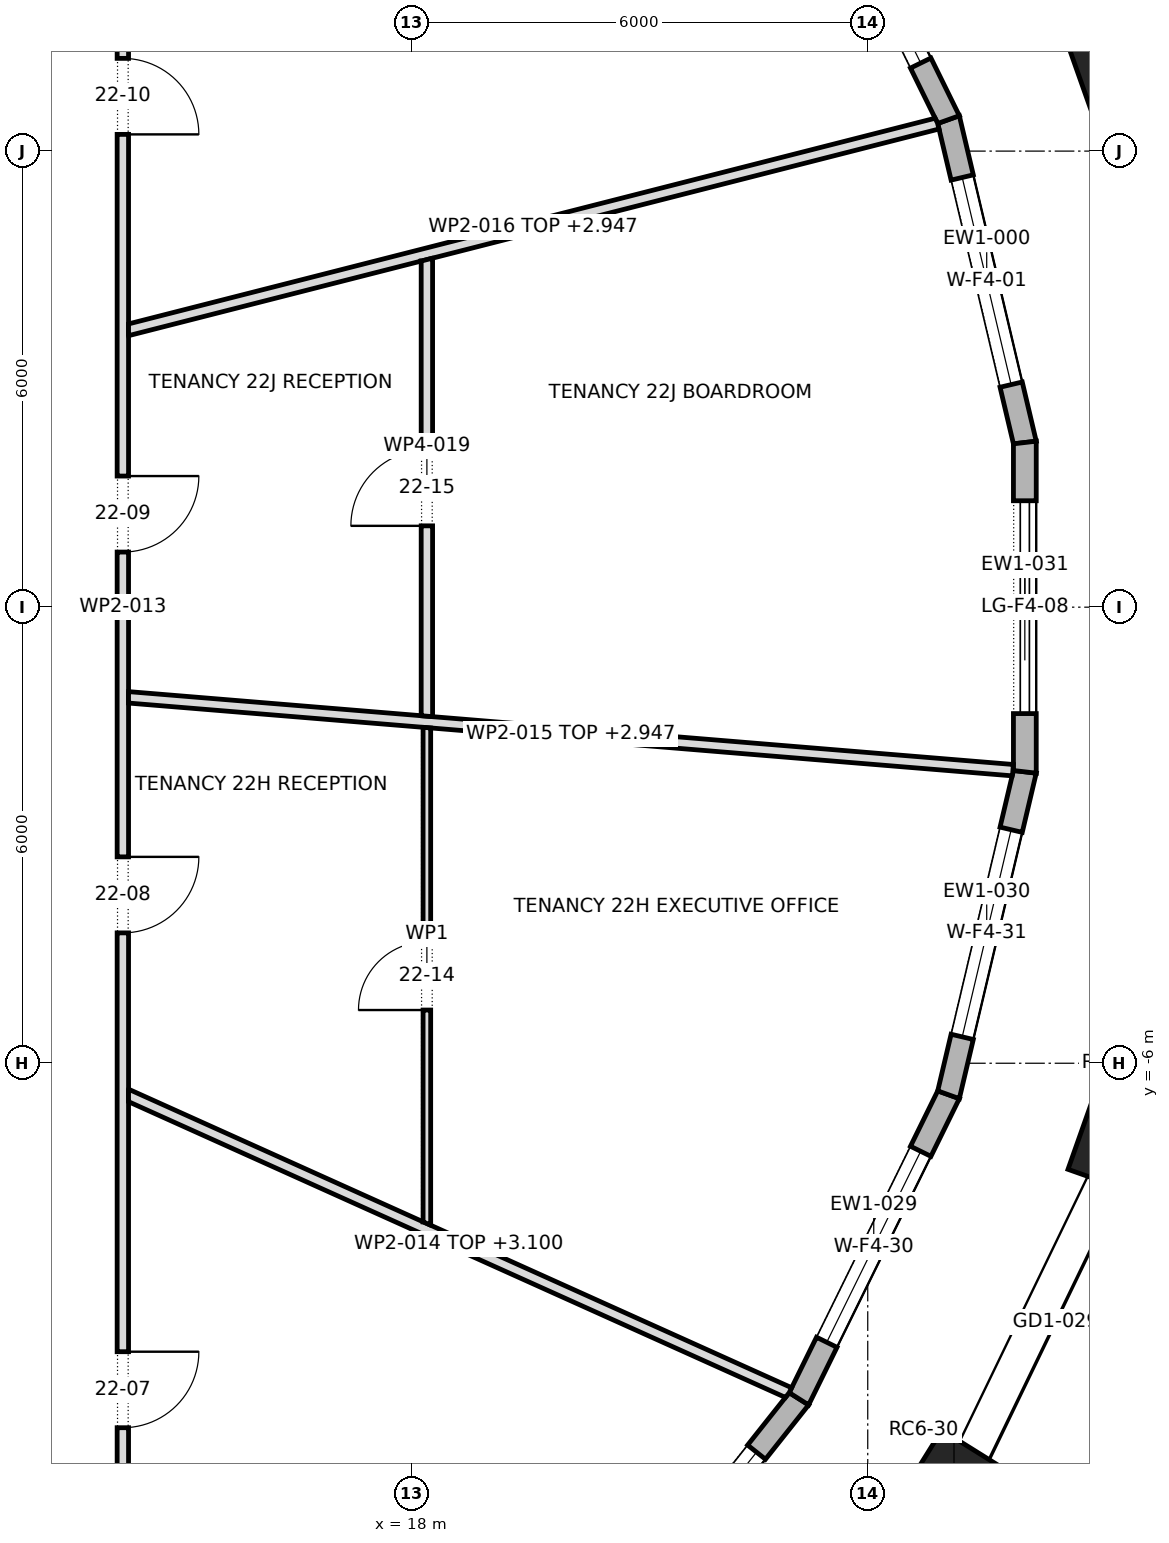
"""IFC4 building model, lengths in metres.
Left out: names, types, materials, properties, quantities, classifications, styles, units other than length and angle.
Written with IfcOpenShell. Run it as: python <this file> out.ifc"""

import sys

from ifc_helpers import new_model, si_unit, direction, frame, frame_2d, origin, origin_2d, place, context, subcontext, project, spatial, polyline, rectangle, outline, extrude, element, fill, save


model = new_model("IFC4")
c1 = context("Model", 3, precision=1e-05, world=origin(), true_north=direction((0.0, 1.0)))
c2 = subcontext(c1, "Body", "Model", "MODEL_VIEW")
j1 = project(units=[si_unit("LENGTHUNIT", "METRE"), si_unit("PLANEANGLEUNIT", "RADIAN")], contexts=[c1])
p1 = place(None, origin())
s1 = spatial("IfcSite", under=j1, at=p1, CompositionType="ELEMENT")
p2 = place(p1, origin())
s2 = spatial("IfcBuilding", under=s1, at=p2, CompositionType="ELEMENT")
p3 = place(p2, frame((0.0, 0.0, 312.3)))
s3 = spatial("IfcBuildingStorey", under=s2, at=p3, CompositionType="ELEMENT", Elevation=312.3)
for number, where, z_axis, x_axis in (
    (1, (27.273, 7.091, 0.0), (0.0, 0.0, 1.0), (-0.334, 0.943, 0.0)),
    (2, (25.135, -11.516, 0.0), (0.0, 0.0, 1.0), (0.529, 0.849, 0.0)),
    (3, (27.273, -7.091, 0.0), (0.0, 0.0, 1.0), (0.334, 0.943, 0.0)),
):
    element("IfcColumn", number, at=place(p3, frame(where, z_axis=z_axis, x_axis=x_axis)), inside=s3, PredefinedType="COLUMN", context=c2, shape_type="SweptSolid", body=[
        extrude(rectangle(XDim=1.0, YDim=1.0, at=origin_2d()), origin(), (0.0, 0.0, 1.0), 4.0),
    ])
p4 = place(p3, frame((26.067, 2.166, 0.0), z_axis=(0.0, 0.0, 1.0), x_axis=(-0.229974411334, 0.973196675977, 0.0)))
e4 = element("IfcWall", 4, at=p4, inside=s3, PredefinedType="STANDARD", context=c2, shape_type="SweptSolid", body=[
    extrude(outline(polyline([(-0.018, -0.15), (4.382, -0.15), (4.348, 0.15), (0.018, 0.15), (-0.018, -0.15)])), origin(), (0.0, 0.0, 1.0), 3.7),
])
p5 = place(p4, frame((0.783, 0.0, 0.6)))
e5 = element("IfcOpeningElement", 5, at=p5, cuts=e4, PredefinedType="OPENING", context=c2, shape_type="SweptSolid", body=[
    extrude(rectangle(XDim=2.8, YDim=2.65, at=frame_2d((1.4, 1.325))), frame((0.0, 0.162, 0.0), z_axis=(0.0, -1.0, 0.0), x_axis=(1.0, 0.0, 0.0)), (0.0, 0.0, 1.0), 0.324),
])
p6 = place(p3, frame((25.063, 6.415, 0.0), z_axis=(0.0, 0.0, 1.0), x_axis=(-0.441509050872, 0.897256796017, 0.0)))
e6 = element("IfcWall", 6, at=p6, inside=s3, PredefinedType="STANDARD", context=c2, shape_type="SweptSolid", body=[
    extrude(outline(polyline([(-0.017, -0.15), (4.474, -0.15), (4.442, 0.15), (0.017, 0.15), (-0.017, -0.15)])), origin(), (0.0, 0.0, 1.0), 3.7),
])
p7 = place(p6, frame((0.829, 0.0, 0.6)))
e7 = element("IfcOpeningElement", 7, at=p7, cuts=e6, PredefinedType="OPENING", context=c2, shape_type="SweptSolid", body=[
    extrude(rectangle(XDim=2.8, YDim=2.65, at=frame_2d((1.4, 1.325))), frame((0.0, 0.162, 0.0), z_axis=(0.0, -1.0, 0.0), x_axis=(1.0, 0.0, 0.0)), (0.0, 0.0, 1.0), 0.324),
])
p8 = place(p3, frame((20.239, -14.012, 0.0), z_axis=(0.0, 0.0, 1.0), x_axis=(0.621682706372, 0.78326918272, 0.0)))
e8 = element("IfcWall", 8, at=p8, inside=s3, PredefinedType="STANDARD", context=c2, shape_type="SweptSolid", body=[
    extrude(outline(polyline([(-0.015, -0.15), (4.609, -0.15), (4.577, 0.15), (0.015, 0.15), (-0.015, -0.15)])), origin(), (0.0, 0.0, 1.0), 3.7),
])
p9 = place(p8, frame((0.896, 0.0, 0.6)))
e9 = element("IfcOpeningElement", 9, at=p9, cuts=e8, PredefinedType="OPENING", context=c2, shape_type="SweptSolid", body=[
    extrude(rectangle(XDim=2.8, YDim=2.65, at=frame_2d((1.4, 1.325))), frame((0.0, 0.162, 0.0), z_axis=(0.0, -1.0, 0.0), x_axis=(1.0, 0.0, 0.0)), (0.0, 0.0, 1.0), 0.324),
])
p10 = place(p3, frame((23.094, -10.415, 0.0), z_axis=(0.0, 0.0, 1.0), x_axis=(0.441509050872, 0.897256796017, 0.0)))
e10 = element("IfcWall", 10, at=p10, inside=s3, PredefinedType="STANDARD", context=c2, shape_type="SweptSolid", body=[
    extrude(outline(polyline([(-0.016, -0.15), (4.475, -0.15), (4.441, 0.15), (0.016, 0.15), (-0.016, -0.15)])), origin(), (0.0, 0.0, 1.0), 3.7),
])
p11 = place(p10, frame((0.829, 0.0, 0.6)))
e11 = element("IfcOpeningElement", 11, at=p11, cuts=e10, PredefinedType="OPENING", context=c2, shape_type="SweptSolid", body=[
    extrude(rectangle(XDim=2.8, YDim=2.65, at=frame_2d((1.4, 1.325))), frame((0.0, 0.162, 0.0), z_axis=(0.0, -1.0, 0.0), x_axis=(1.0, 0.0, 0.0)), (0.0, 0.0, 1.0), 0.324),
])
p12 = place(p3, frame((25.063, -6.415, 0.0), z_axis=(0.0, 0.0, 1.0), x_axis=(0.229974411334, 0.973196675977, 0.0)))
e12 = element("IfcWall", 12, at=p12, inside=s3, PredefinedType="STANDARD", context=c2, shape_type="SweptSolid", body=[
    extrude(outline(polyline([(-0.017, -0.15), (4.383, -0.15), (4.348, 0.15), (0.017, 0.15), (-0.017, -0.15)])), origin(), (0.0, 0.0, 1.0), 3.7),
])
p13 = place(p12, frame((0.783, 0.0, 0.6)))
e13 = element("IfcOpeningElement", 13, at=p13, cuts=e12, PredefinedType="OPENING", context=c2, shape_type="SweptSolid", body=[
    extrude(rectangle(XDim=2.8, YDim=2.65, at=frame_2d((1.4, 1.325))), frame((0.0, 0.162, 0.0), z_axis=(0.0, -1.0, 0.0), x_axis=(1.0, 0.0, 0.0)), (0.0, 0.0, 1.0), 0.324),
])
p14 = place(p3, frame((26.067, -2.166, 0.0), z_axis=(0.0, 0.0, 1.0), x_axis=(0.0, 1.0, 0.0)))
e14 = element("IfcWall", 14, at=p14, inside=s3, PredefinedType="STANDARD", context=c2, shape_type="SweptSolid", body=[
    extrude(outline(polyline([(-0.018, -0.15), (4.35, -0.15), (4.315, 0.15), (0.018, 0.15), (-0.018, -0.15)])), origin(), (0.0, 0.0, 1.0), 3.7),
])
p15 = place(p14, frame((0.766, 0.0, 0.0)))
e15 = element("IfcOpeningElement", 15, at=p15, cuts=e14, PredefinedType="OPENING", context=c2, shape_type="SweptSolid", body=[
    extrude(rectangle(XDim=2.8, YDim=3.25, at=frame_2d((1.4, 1.625))), frame((0.0, 0.162, 0.0), z_axis=(0.0, -1.0, 0.0), x_axis=(1.0, 0.0, 0.0)), (0.0, 0.0, 1.0), 0.324),
])
p16 = place(p3, frame((14.2, -14.275, 0.0), z_axis=(0.0, 0.0, 1.0), x_axis=(0.0, 1.0, 0.0)))
e16 = element("IfcWall", 16, at=p16, inside=s3, PredefinedType="PARTITIONING", context=c2, shape_type="SweptSolid", body=[
    extrude(outline(polyline([(28.55, -0.075), (28.55, -0.075), (28.4, 0.075), (26.517, 0.075), (24.633, 0.075), (22.75, 0.075), (20.866, 0.075), (18.983, 0.075), (17.1, 0.075), (15.217, 0.075), (13.333, 0.075), (11.45, 0.075), (9.567, 0.075), (7.683, 0.075), (5.8, 0.075), (3.917, 0.075), (2.033, 0.075), (0.15, 0.075), (0.0, -0.075), (1.903, -0.075), (3.807, -0.075), (5.71, -0.075), (7.613, -0.075), (9.517, -0.075), (11.42, -0.075), (13.323, -0.075), (15.227, -0.075), (17.13, -0.075), (19.033, -0.075), (20.937, -0.075), (22.84, -0.075), (24.743, -0.075), (26.646, -0.075), (28.55, -0.075)])), origin(), (0.0, 0.0, 1.0), 3.7),
])
p17 = place(p16, frame((3.48, 0.0, 0.0)))
e17 = element("IfcOpeningElement", 17, at=p17, cuts=e16, PredefinedType="OPENING", context=c2, shape_type="SweptSolid", body=[
    extrude(rectangle(XDim=1.0, YDim=2.1, at=frame_2d((0.5, 1.05))), frame((0.0, 0.087, 0.0), z_axis=(0.0, -1.0, 0.0), x_axis=(1.0, 0.0, 0.0)), (0.0, 0.0, 1.0), 0.174),
])
p18 = place(p16, frame((9.99, 0.0, 0.0)))
e18 = element("IfcOpeningElement", 18, at=p18, cuts=e16, PredefinedType="OPENING", context=c2, shape_type="SweptSolid", body=[
    extrude(rectangle(XDim=1.0, YDim=2.1, at=frame_2d((0.5, 1.05))), frame((0.0, 0.087, 0.0), z_axis=(0.0, -1.0, 0.0), x_axis=(1.0, 0.0, 0.0)), (0.0, 0.0, 1.0), 0.174),
])
p19 = place(p16, frame((15.0, 0.0, 0.0)))
e19 = element("IfcOpeningElement", 19, at=p19, cuts=e16, PredefinedType="OPENING", context=c2, shape_type="SweptSolid", body=[
    extrude(rectangle(XDim=1.0, YDim=2.1, at=frame_2d((0.5, 1.05))), frame((0.0, 0.087, 0.0), z_axis=(0.0, -1.0, 0.0), x_axis=(1.0, 0.0, 0.0)), (0.0, 0.0, 1.0), 0.174),
])
p20 = place(p16, frame((20.495, 0.0, 0.0)))
e20 = element("IfcOpeningElement", 20, at=p20, cuts=e16, PredefinedType="OPENING", context=c2, shape_type="SweptSolid", body=[
    extrude(rectangle(XDim=1.0, YDim=2.1, at=frame_2d((0.5, 1.05))), frame((0.0, 0.087, 0.0), z_axis=(0.0, -1.0, 0.0), x_axis=(1.0, 0.0, 0.0)), (0.0, 0.0, 1.0), 0.174),
])
p21 = place(p3, frame((14.245, -6.41, 0.0), z_axis=(0.0, 0.0, 1.0), x_axis=(0.911854164739, -0.410514289944, 0.0)))
e21 = element("IfcWall", 21, at=p21, inside=s3, PredefinedType="PARTITIONING", context=c2, shape_type="SweptSolid", body=[
    extrude(outline(polyline([(0.067, -0.075), (1.963, -0.075), (3.858, -0.075), (5.754, -0.075), (7.649, -0.075), (9.545, -0.075), (9.564, 0.003), (9.567, 0.069), (9.567, 0.075), (7.795, 0.075), (6.024, 0.075), (4.252, 0.075), (4.25, 0.074), (4.249, 0.075), (2.833, 0.075), (1.417, 0.075), (0.0, 0.075), (0.0, 0.074), (0.067, -0.075)])), origin(), (0.0, 0.0, 1.0), 3.1),
])
p22 = place(p3, frame((14.269, -1.186, 0.0), z_axis=(0.0, 0.0, 1.0), x_axis=(0.996625584757, -0.082081933503, 0.0)))
e22 = element("IfcWall", 22, at=p22, inside=s3, PredefinedType="PARTITIONING", context=c2, shape_type="SweptSolid", body=[
    extrude(outline(polyline([(0.012, -0.075), (1.956, -0.075), (3.9, -0.075), (5.844, -0.075), (7.788, -0.075), (9.732, -0.075), (11.676, -0.075), (11.68, -0.05), (11.68, 0.075), (9.733, 0.075), (7.787, 0.075), (5.84, 0.075), (3.893, 0.075), (1.947, 0.075), (0.0, 0.075), (0.0, 0.07), (0.012, -0.075)])), origin(), (0.0, 0.0, 1.0), 2.947),
])
p23 = place(p3, frame((14.257, 3.645, 0.0), z_axis=(0.0, 0.0, 1.0), x_axis=(0.968996414646, 0.247074783017, 0.0)))
e23 = element("IfcWall", 23, at=p23, inside=s3, PredefinedType="PARTITIONING", context=c2, shape_type="SweptSolid", body=[
    extrude(outline(polyline([(0.0, -0.075), (1.987, -0.075), (3.973, -0.075), (3.973, -0.073), (3.979, -0.075), (5.735, -0.075), (7.491, -0.075), (9.248, -0.075), (11.004, -0.075), (11.004, 0.008), (10.99, 0.075), (9.164, 0.075), (7.339, 0.075), (5.514, 0.075), (3.688, 0.075), (1.863, 0.075), (0.038, 0.075), (0.0, -0.074), (0.0, -0.075)])), origin(), (0.0, 0.0, 1.0), 2.947),
])
p24 = place(p3, frame((18.2, -1.581, 0.0), z_axis=(0.0, 0.0, 1.0), x_axis=(0.0, -1.0, 0.0)))
e24 = element("IfcWall", 24, at=p24, inside=s3, PredefinedType="PARTITIONING", context=c2, shape_type="SweptSolid", body=[
    extrude(outline(polyline([(0.0, -0.05), (1.626, -0.05), (3.252, -0.05), (4.879, -0.05), (6.505, -0.05), (6.55, 0.05), (6.55, 0.05), (4.915, 0.05), (3.279, 0.05), (1.643, 0.05), (0.008, 0.05), (0.0, -0.044), (0.0, -0.05)])), origin(), (0.0, 0.0, 1.0), 3.7),
])
p25 = place(p24, frame((2.819, 0.0, 0.0)))
e25 = element("IfcOpeningElement", 25, at=p25, cuts=e24, PredefinedType="OPENING", context=c2, shape_type="SweptSolid", body=[
    extrude(rectangle(XDim=0.9, YDim=2.1, at=frame_2d((0.45, 1.05))), frame((0.0, 0.062, 0.0), z_axis=(0.0, -1.0, 0.0), x_axis=(1.0, 0.0, 0.0)), (0.0, 0.0, 1.0), 0.124),
])
p26 = place(p3, frame((18.2, 4.592, 0.0), z_axis=(0.0, 0.0, 1.0), x_axis=(0.0, -1.0, 0.0)))
e26 = element("IfcWall", 26, at=p26, inside=s3, PredefinedType="PARTITIONING", context=c2, shape_type="SweptSolid", body=[
    extrude(outline(polyline([(0.038, -0.075), (2.032, -0.075), (4.026, -0.075), (6.02, -0.075), (6.031, 0.07), (6.031, 0.075), (4.524, 0.075), (3.016, 0.075), (1.508, 0.075), (0.0, 0.075), (0.0, 0.074), (0.038, -0.075)])), origin(), (0.0, 0.0, 1.0), 3.7),
])
p27 = place(p26, frame((2.521, 0.0, 0.0)))
e27 = element("IfcOpeningElement", 27, at=p27, cuts=e26, PredefinedType="OPENING", context=c2, shape_type="SweptSolid", body=[
    extrude(rectangle(XDim=1.0, YDim=2.1, at=frame_2d((0.5, 1.05))), frame((0.0, 0.087, 0.0), z_axis=(0.0, -1.0, 0.0), x_axis=(1.0, 0.0, 0.0)), (0.0, 0.0, 1.0), 0.174),
])
p28 = place(p5, origin())
e28 = element("IfcWindow", 28, at=p28, inside=s3, PartitioningType="DOUBLE_PANEL_VERTICAL", PredefinedType="WINDOW", context=c2, shape_type="SweptSolid", body=[
    extrude(rectangle(XDim=2.8, YDim=2.65, at=frame_2d((1.4, 1.325))), frame((0.0, 0.03, 0.0), z_axis=(0.0, -1.0, 0.0), x_axis=(1.0, 0.0, 0.0)), (0.0, 0.0, 1.0), 0.06),
])
fill(e5, e28)
p29 = place(p7, origin())
e29 = element("IfcWindow", 29, at=p29, inside=s3, PartitioningType="DOUBLE_PANEL_VERTICAL", PredefinedType="WINDOW", context=c2, shape_type="SweptSolid", body=[
    extrude(rectangle(XDim=2.8, YDim=2.65, at=frame_2d((1.4, 1.325))), frame((0.0, 0.03, 0.0), z_axis=(0.0, -1.0, 0.0), x_axis=(1.0, 0.0, 0.0)), (0.0, 0.0, 1.0), 0.06),
])
fill(e7, e29)
p30 = place(p9, origin())
e30 = element("IfcWindow", 30, at=p30, inside=s3, PartitioningType="DOUBLE_PANEL_VERTICAL", PredefinedType="WINDOW", context=c2, shape_type="SweptSolid", body=[
    extrude(rectangle(XDim=2.8, YDim=2.65, at=frame_2d((1.4, 1.325))), frame((0.0, 0.03, 0.0), z_axis=(0.0, -1.0, 0.0), x_axis=(1.0, 0.0, 0.0)), (0.0, 0.0, 1.0), 0.06),
])
fill(e9, e30)
p31 = place(p11, origin())
e31 = element("IfcWindow", 31, at=p31, inside=s3, PartitioningType="DOUBLE_PANEL_VERTICAL", PredefinedType="WINDOW", context=c2, shape_type="SweptSolid", body=[
    extrude(rectangle(XDim=2.8, YDim=2.65, at=frame_2d((1.4, 1.325))), frame((0.0, 0.03, 0.0), z_axis=(0.0, -1.0, 0.0), x_axis=(1.0, 0.0, 0.0)), (0.0, 0.0, 1.0), 0.06),
])
fill(e11, e31)
p32 = place(p13, origin())
e32 = element("IfcWindow", 32, at=p32, inside=s3, PartitioningType="DOUBLE_PANEL_VERTICAL", PredefinedType="WINDOW", context=c2, shape_type="SweptSolid", body=[
    extrude(rectangle(XDim=2.8, YDim=2.65, at=frame_2d((1.4, 1.325))), frame((0.0, 0.03, 0.0), z_axis=(0.0, -1.0, 0.0), x_axis=(1.0, 0.0, 0.0)), (0.0, 0.0, 1.0), 0.06),
])
fill(e13, e32)
p33 = place(p15, origin())
e33 = element("IfcDoor", 33, at=p33, inside=s3, OperationType="DOUBLE_DOOR_SLIDING", PredefinedType="DOOR", context=c2, shape_type="SweptSolid", body=[
    extrude(rectangle(XDim=2.8, YDim=3.25, at=frame_2d((1.4, 1.625))), frame((0.0, 0.025, 0.0), z_axis=(0.0, -1.0, 0.0), x_axis=(1.0, 0.0, 0.0)), (0.0, 0.0, 1.0), 0.05),
])
fill(e15, e33)
p34 = place(p17, frame((1.0, 0.0, 0.0), z_axis=(0.0, 0.0, 1.0), x_axis=(-1.0, 0.0, 0.0)))
e34 = element("IfcDoor", 34, at=p34, inside=s3, OperationType="SINGLE_SWING_RIGHT", PredefinedType="DOOR", context=c2, shape_type="SweptSolid", body=[
    extrude(rectangle(XDim=1.0, YDim=2.1, at=frame_2d((0.5, 1.05))), frame((0.0, 0.025, 0.0), z_axis=(0.0, -1.0, 0.0), x_axis=(1.0, 0.0, 0.0)), (0.0, 0.0, 1.0), 0.05),
])
fill(e17, e34)
p35 = place(p18, frame((1.0, 0.0, 0.0), z_axis=(0.0, 0.0, 1.0), x_axis=(-1.0, 0.0, 0.0)))
e35 = element("IfcDoor", 35, at=p35, inside=s3, OperationType="SINGLE_SWING_RIGHT", PredefinedType="DOOR", context=c2, shape_type="SweptSolid", body=[
    extrude(rectangle(XDim=1.0, YDim=2.1, at=frame_2d((0.5, 1.05))), frame((0.0, 0.025, 0.0), z_axis=(0.0, -1.0, 0.0), x_axis=(1.0, 0.0, 0.0)), (0.0, 0.0, 1.0), 0.05),
])
fill(e18, e35)
p36 = place(p19, frame((1.0, 0.0, 0.0), z_axis=(0.0, 0.0, 1.0), x_axis=(-1.0, 0.0, 0.0)))
e36 = element("IfcDoor", 36, at=p36, inside=s3, OperationType="SINGLE_SWING_RIGHT", PredefinedType="DOOR", context=c2, shape_type="SweptSolid", body=[
    extrude(rectangle(XDim=1.0, YDim=2.1, at=frame_2d((0.5, 1.05))), frame((0.0, 0.025, 0.0), z_axis=(0.0, -1.0, 0.0), x_axis=(1.0, 0.0, 0.0)), (0.0, 0.0, 1.0), 0.05),
])
fill(e19, e36)
p37 = place(p20, frame((1.0, 0.0, 0.0), z_axis=(0.0, 0.0, 1.0), x_axis=(-1.0, 0.0, 0.0)))
e37 = element("IfcDoor", 37, at=p37, inside=s3, OperationType="SINGLE_SWING_LEFT", PredefinedType="DOOR", context=c2, shape_type="SweptSolid", body=[
    extrude(rectangle(XDim=1.0, YDim=2.1, at=frame_2d((0.5, 1.05))), frame((0.0, 0.025, 0.0), z_axis=(0.0, -1.0, 0.0), x_axis=(1.0, 0.0, 0.0)), (0.0, 0.0, 1.0), 0.05),
])
fill(e20, e37)
p38 = place(p25, frame((0.9, 0.0, 0.0), z_axis=(0.0, 0.0, 1.0), x_axis=(-1.0, 0.0, 0.0)))
e38 = element("IfcDoor", 38, at=p38, inside=s3, OperationType="SINGLE_SWING_RIGHT", PredefinedType="DOOR", context=c2, shape_type="SweptSolid", body=[
    extrude(rectangle(XDim=0.9, YDim=2.1, at=frame_2d((0.45, 1.05))), frame((0.0, 0.025, 0.0), z_axis=(0.0, -1.0, 0.0), x_axis=(1.0, 0.0, 0.0)), (0.0, 0.0, 1.0), 0.05),
])
fill(e25, e38)
p39 = place(p27, frame((1.0, 0.0, 0.0), z_axis=(0.0, 0.0, 1.0), x_axis=(-1.0, 0.0, 0.0)))
e39 = element("IfcDoor", 39, at=p39, inside=s3, OperationType="SINGLE_SWING_RIGHT", PredefinedType="DOOR", context=c2, shape_type="SweptSolid", body=[
    extrude(rectangle(XDim=1.0, YDim=2.1, at=frame_2d((0.5, 1.05))), frame((0.0, 0.025, 0.0), z_axis=(0.0, -1.0, 0.0), x_axis=(1.0, 0.0, 0.0)), (0.0, 0.0, 1.0), 0.05),
])
fill(e27, e39)
save(model, sys.argv[1])
